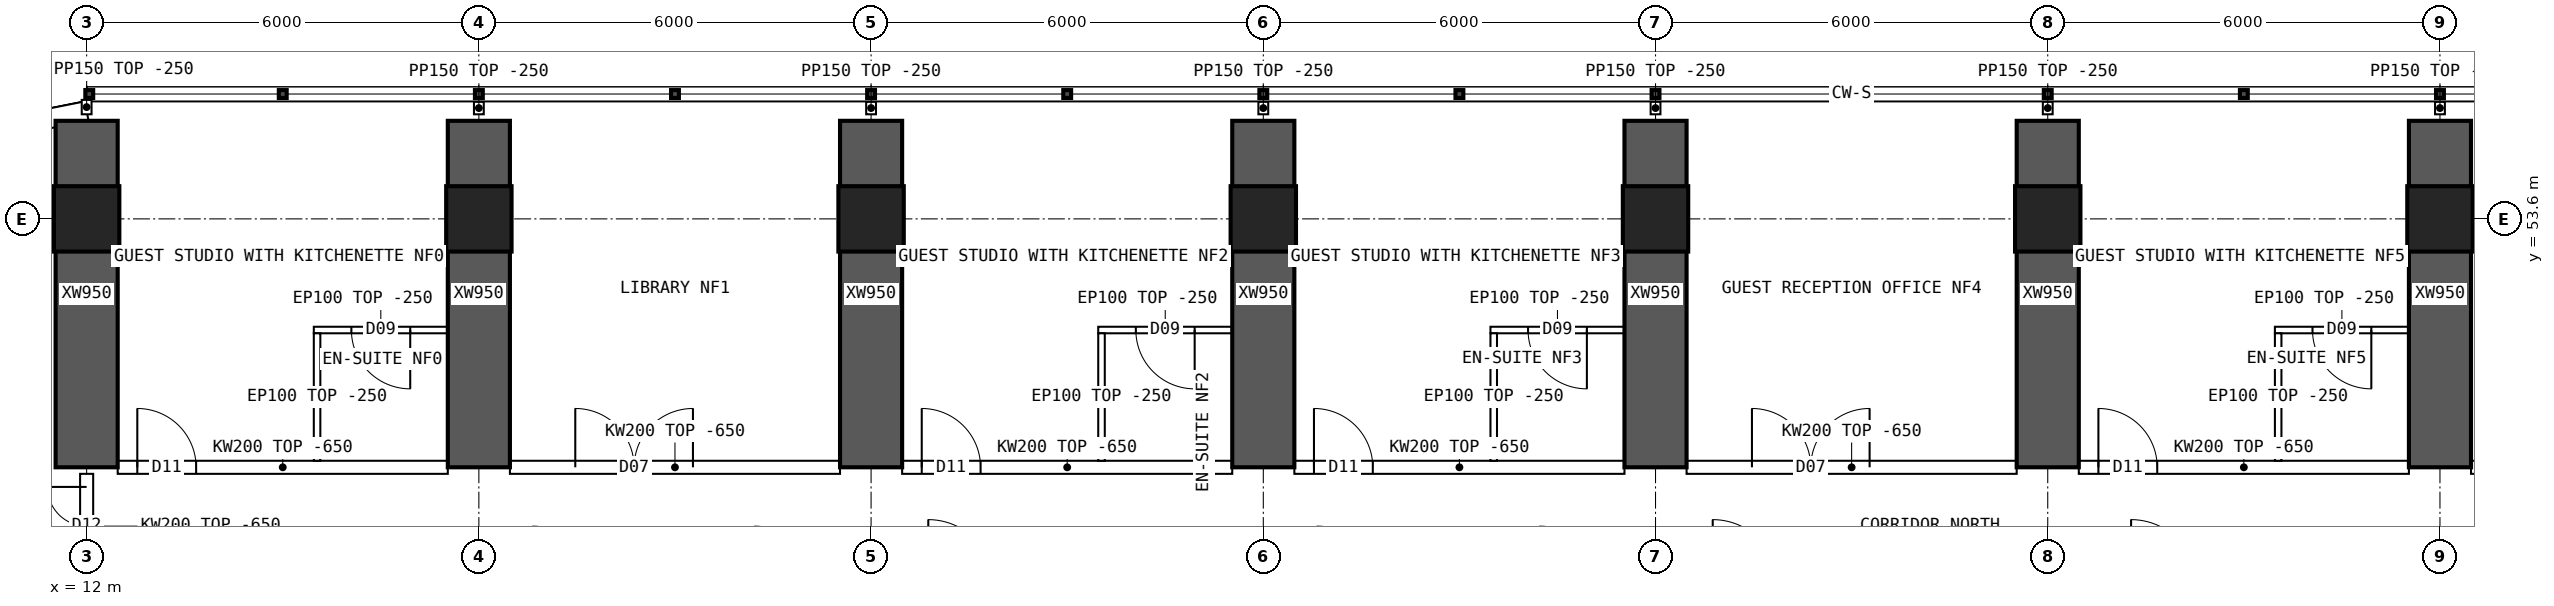
"""IFC4 building model, lengths in metres.
Left out: names, types, materials, properties, quantities, classifications, styles, units other than length and angle.
Written with IfcOpenShell. Run it as: python <this file> out.ifc"""

import sys

from ifc_helpers import new_model, si_unit, direction, frame, frame_2d, origin, origin_2d, place, context, subcontext, project, spatial, polyline, rectangle, hollow_rectangle, outline, extrude, element, fill, save


model = new_model("IFC4")
c1 = context("Model", 3, precision=1e-05, world=origin(), true_north=direction((0.0, 1.0)))
c2 = subcontext(c1, "Body", "Model", "MODEL_VIEW")
j1 = project(units=[si_unit("LENGTHUNIT", "METRE"), si_unit("PLANEANGLEUNIT", "RADIAN")], contexts=[c1])
p1 = place(None, origin())
s1 = spatial("IfcSite", under=j1, at=p1, CompositionType="ELEMENT")
p2 = place(p1, origin())
s2 = spatial("IfcBuilding", under=s1, at=p2, CompositionType="ELEMENT")
p3 = place(p2, frame((0.0, 0.0, 76.15)))
s3 = spatial("IfcBuildingStorey", under=s2, at=p3, CompositionType="ELEMENT", Elevation=76.15)
for number, where, z_axis, x_axis in (
    (1, (12.0, 53.6, 0.0), (0.0, 0.0, 1.0), (1.0, 0.0, 0.0)),
    (2, (18.0, 53.6, 0.0), (0.0, 0.0, 1.0), (1.0, 0.0, 0.0)),
    (3, (24.0, 53.6, 0.0), (0.0, 0.0, 1.0), (1.0, 0.0, 0.0)),
    (4, (30.0, 53.6, 0.0), (0.0, 0.0, 1.0), (1.0, 0.0, 0.0)),
    (5, (36.0, 53.6, 0.0), (0.0, 0.0, 1.0), (1.0, 0.0, 0.0)),
    (6, (42.0, 53.6, 0.0), (0.0, 0.0, 1.0), (1.0, 0.0, 0.0)),
    (7, (48.0, 53.6, 0.0), (0.0, 0.0, 1.0), (1.0, 0.0, 0.0)),
):
    element("IfcColumn", number, at=place(p3, frame(where, z_axis=z_axis, x_axis=x_axis)), inside=s3, PredefinedType="COLUMN", context=c2, shape_type="SweptSolid", body=[
        extrude(hollow_rectangle(XDim=1.0, YDim=1.0, WallThickness=0.1, at=origin_2d()), origin(), (0.0, 0.0, 1.0), 4.5),
    ])
for number, where, z_axis, x_axis in (
    (8, (12.0, 49.8, 0.0), (0.0, 0.0, 1.0), (0.0, 1.0, 0.0)),
    (9, (18.0, 49.8, 0.0), (0.0, 0.0, 1.0), (0.0, 1.0, 0.0)),
    (10, (24.0, 49.8, 0.0), (0.0, 0.0, 1.0), (0.0, 1.0, 0.0)),
    (11, (30.0, 49.8, 0.0), (0.0, 0.0, 1.0), (0.0, 1.0, 0.0)),
    (12, (36.0, 49.8, 0.0), (0.0, 0.0, 1.0), (0.0, 1.0, 0.0)),
    (13, (42.0, 49.8, 0.0), (0.0, 0.0, 1.0), (0.0, 1.0, 0.0)),
    (14, (48.0, 49.8, 0.0), (0.0, 0.0, 1.0), (0.0, 1.0, 0.0)),
):
    element("IfcWall", number, at=place(p3, frame(where, z_axis=z_axis, x_axis=x_axis)), inside=s3, PredefinedType="SHEAR", context=c2, shape_type="SweptSolid", body=[
        extrude(rectangle(XDim=5.3, YDim=0.95, at=frame_2d((2.65, 0.0))), origin(), (0.0, 0.0, 1.0), 4.5),
    ])
p4 = place(p3, frame((12.0, 55.25, 0.0), z_axis=(0.0, 0.0, 1.0), x_axis=(-0.980787251524, -0.195080412259, 0.0)))
e15 = element("IfcWall", 15, at=p4, inside=s3, PredefinedType="SOLIDWALL", context=c2, shape_type="SweptSolid", body=[
    extrude(outline(polyline([(-0.03, -0.15), (3.249, -0.15), (3.189, 0.15), (0.03, 0.15), (-0.03, -0.15)])), origin(), (0.0, 0.0, 1.0), 4.25),
])
p5 = place(p4, frame((0.909, 0.0, 0.9)))
e16 = element("IfcOpeningElement", 16, at=p5, cuts=e15, PredefinedType="OPENING", context=c2, shape_type="SweptSolid", body=[
    extrude(rectangle(XDim=1.4, YDim=1.8, at=frame_2d((0.7, 0.9))), frame((0.0, 0.16, 0.0), z_axis=(0.0, -1.0, 0.0), x_axis=(1.0, 0.0, 0.0)), (0.0, 0.0, 1.0), 0.32),
])
p6 = place(p3, frame((8.844, 55.819, 0.0), z_axis=(0.0, 0.0, 1.0), x_axis=(0.980792126237, 0.195055902531, 0.0)))
e17 = element("IfcWall", 17, at=p6, inside=s3, PredefinedType="PARAPET", context=c2, shape_type="SweptSolid", body=[
    extrude(rectangle(XDim=3.233, YDim=0.2, at=frame_2d((1.616, 0.0))), origin(), (0.0, 0.0, 1.0), 1.1),
])
p7 = place(p3, frame((12.475, 49.8, 0.0), z_axis=(0.0, 0.0, 1.0), x_axis=(1.0, 0.0, 0.0)))
e18 = element("IfcWall", 18, at=p7, inside=s3, PredefinedType="SOLIDWALL", context=c2, shape_type="SweptSolid", body=[
    extrude(outline(polyline([(0.0, 0.0), (5.05, 0.0), (5.05, 3.85), (0.0, 3.85), (0.0, 0.0)])), frame((0.0, 0.1, 0.0), z_axis=(0.0, -1.0, 0.0), x_axis=(1.0, 0.0, 0.0)), (0.0, 0.0, 1.0), 0.2),
])
p8 = place(p7, frame((0.3, 0.0, 0.0)))
e19 = element("IfcOpeningElement", 19, at=p8, cuts=e18, PredefinedType="OPENING", context=c2, shape_type="SweptSolid", body=[
    extrude(rectangle(XDim=0.9, YDim=2.1, at=frame_2d((0.45, 1.05))), frame((0.0, 0.11, 0.0), z_axis=(0.0, -1.0, 0.0), x_axis=(1.0, 0.0, 0.0)), (0.0, 0.0, 1.0), 0.22),
])
p9 = place(p3, frame((18.475, 49.8, 0.0), z_axis=(0.0, 0.0, 1.0), x_axis=(1.0, 0.0, 0.0)))
e20 = element("IfcWall", 20, at=p9, inside=s3, PredefinedType="SOLIDWALL", context=c2, shape_type="SweptSolid", body=[
    extrude(outline(polyline([(0.0, 0.0), (5.05, 0.0), (5.05, 3.85), (0.0, 3.85), (0.0, 0.0)])), frame((0.0, 0.1, 0.0), z_axis=(0.0, -1.0, 0.0), x_axis=(1.0, 0.0, 0.0)), (0.0, 0.0, 1.0), 0.2),
])
p10 = place(p9, frame((1.0, 0.0, 0.0)))
e21 = element("IfcOpeningElement", 21, at=p10, cuts=e20, PredefinedType="OPENING", context=c2, shape_type="SweptSolid", body=[
    extrude(rectangle(XDim=1.8, YDim=2.1, at=frame_2d((0.9, 1.05))), frame((0.0, 0.11, 0.0), z_axis=(0.0, -1.0, 0.0), x_axis=(1.0, 0.0, 0.0)), (0.0, 0.0, 1.0), 0.22),
])
p11 = place(p3, frame((24.475, 49.8, 0.0), z_axis=(0.0, 0.0, 1.0), x_axis=(1.0, 0.0, 0.0)))
e22 = element("IfcWall", 22, at=p11, inside=s3, PredefinedType="SOLIDWALL", context=c2, shape_type="SweptSolid", body=[
    extrude(outline(polyline([(0.0, 0.0), (5.05, 0.0), (5.05, 3.85), (0.0, 3.85), (0.0, 0.0)])), frame((0.0, 0.1, 0.0), z_axis=(0.0, -1.0, 0.0), x_axis=(1.0, 0.0, 0.0)), (0.0, 0.0, 1.0), 0.2),
])
p12 = place(p11, frame((0.3, 0.0, 0.0)))
e23 = element("IfcOpeningElement", 23, at=p12, cuts=e22, PredefinedType="OPENING", context=c2, shape_type="SweptSolid", body=[
    extrude(rectangle(XDim=0.9, YDim=2.1, at=frame_2d((0.45, 1.05))), frame((0.0, 0.11, 0.0), z_axis=(0.0, -1.0, 0.0), x_axis=(1.0, 0.0, 0.0)), (0.0, 0.0, 1.0), 0.22),
])
p13 = place(p3, frame((30.475, 49.8, 0.0), z_axis=(0.0, 0.0, 1.0), x_axis=(1.0, 0.0, 0.0)))
e24 = element("IfcWall", 24, at=p13, inside=s3, PredefinedType="SOLIDWALL", context=c2, shape_type="SweptSolid", body=[
    extrude(outline(polyline([(0.0, 0.0), (5.05, 0.0), (5.05, 3.85), (0.0, 3.85), (0.0, 0.0)])), frame((0.0, 0.1, 0.0), z_axis=(0.0, -1.0, 0.0), x_axis=(1.0, 0.0, 0.0)), (0.0, 0.0, 1.0), 0.2),
])
p14 = place(p13, frame((0.3, 0.0, 0.0)))
e25 = element("IfcOpeningElement", 25, at=p14, cuts=e24, PredefinedType="OPENING", context=c2, shape_type="SweptSolid", body=[
    extrude(rectangle(XDim=0.9, YDim=2.1, at=frame_2d((0.45, 1.05))), frame((0.0, 0.11, 0.0), z_axis=(0.0, -1.0, 0.0), x_axis=(1.0, 0.0, 0.0)), (0.0, 0.0, 1.0), 0.22),
])
p15 = place(p3, frame((36.475, 49.8, 0.0), z_axis=(0.0, 0.0, 1.0), x_axis=(1.0, 0.0, 0.0)))
e26 = element("IfcWall", 26, at=p15, inside=s3, PredefinedType="SOLIDWALL", context=c2, shape_type="SweptSolid", body=[
    extrude(outline(polyline([(0.0, 0.0), (5.05, 0.0), (5.05, 3.85), (0.0, 3.85), (0.0, 0.0)])), frame((0.0, 0.1, 0.0), z_axis=(0.0, -1.0, 0.0), x_axis=(1.0, 0.0, 0.0)), (0.0, 0.0, 1.0), 0.2),
])
p16 = place(p15, frame((1.0, 0.0, 0.0)))
e27 = element("IfcOpeningElement", 27, at=p16, cuts=e26, PredefinedType="OPENING", context=c2, shape_type="SweptSolid", body=[
    extrude(rectangle(XDim=1.8, YDim=2.1, at=frame_2d((0.9, 1.05))), frame((0.0, 0.11, 0.0), z_axis=(0.0, -1.0, 0.0), x_axis=(1.0, 0.0, 0.0)), (0.0, 0.0, 1.0), 0.22),
])
p17 = place(p3, frame((42.475, 49.8, 0.0), z_axis=(0.0, 0.0, 1.0), x_axis=(1.0, 0.0, 0.0)))
e28 = element("IfcWall", 28, at=p17, inside=s3, PredefinedType="SOLIDWALL", context=c2, shape_type="SweptSolid", body=[
    extrude(outline(polyline([(0.0, 0.0), (5.05, 0.0), (5.05, 3.85), (0.0, 3.85), (0.0, 0.0)])), frame((0.0, 0.1, 0.0), z_axis=(0.0, -1.0, 0.0), x_axis=(1.0, 0.0, 0.0)), (0.0, 0.0, 1.0), 0.2),
])
p18 = place(p17, frame((0.3, 0.0, 0.0)))
e29 = element("IfcOpeningElement", 29, at=p18, cuts=e28, PredefinedType="OPENING", context=c2, shape_type="SweptSolid", body=[
    extrude(rectangle(XDim=0.9, YDim=2.1, at=frame_2d((0.45, 1.05))), frame((0.0, 0.11, 0.0), z_axis=(0.0, -1.0, 0.0), x_axis=(1.0, 0.0, 0.0)), (0.0, 0.0, 1.0), 0.22),
])
p19 = place(p3, frame((48.475, 49.8, 0.0), z_axis=(0.0, 0.0, 1.0), x_axis=(1.0, 0.0, 0.0)))
e30 = element("IfcWall", 30, at=p19, inside=s3, PredefinedType="SOLIDWALL", context=c2, shape_type="SweptSolid", body=[
    extrude(outline(polyline([(0.0, 0.0), (5.05, 0.0), (5.05, 3.85), (0.0, 3.85), (0.0, 0.0)])), frame((0.0, 0.1, 0.0), z_axis=(0.0, -1.0, 0.0), x_axis=(1.0, 0.0, 0.0)), (0.0, 0.0, 1.0), 0.2),
])
p20 = place(p19, frame((0.3, 0.0, 0.0)))
e31 = element("IfcOpeningElement", 31, at=p20, cuts=e30, PredefinedType="OPENING", context=c2, shape_type="SweptSolid", body=[
    extrude(rectangle(XDim=0.9, YDim=2.1, at=frame_2d((0.45, 1.05))), frame((0.0, 0.11, 0.0), z_axis=(0.0, -1.0, 0.0), x_axis=(1.0, 0.0, 0.0)), (0.0, 0.0, 1.0), 0.22),
])
p21 = place(p3, frame((15.475, 51.9, 0.0), z_axis=(0.0, 0.0, 1.0), x_axis=(1.0, 0.0, 0.0)))
e32 = element("IfcWall", 32, at=p21, inside=s3, PredefinedType="PARTITIONING", context=c2, shape_type="SweptSolid", body=[
    extrude(rectangle(XDim=2.05, YDim=0.1, at=frame_2d((1.025, 0.0))), origin(), (0.0, 0.0, 1.0), 4.25),
])
p22 = place(p21, frame((0.575, 0.0, 0.0)))
e33 = element("IfcOpeningElement", 33, at=p22, cuts=e32, PredefinedType="OPENING", context=c2, shape_type="SweptSolid", body=[
    extrude(rectangle(XDim=0.9, YDim=2.1, at=frame_2d((0.45, 1.05))), frame((0.0, 0.06, 0.0), z_axis=(0.0, -1.0, 0.0), x_axis=(1.0, 0.0, 0.0)), (0.0, 0.0, 1.0), 0.12),
])
p23 = place(p3, frame((15.525, 51.85, 0.0), z_axis=(0.0, 0.0, 1.0), x_axis=(0.0, -1.0, 0.0)))
e34 = element("IfcWall", 34, at=p23, inside=s3, PredefinedType="PARTITIONING", context=c2, shape_type="SweptSolid", body=[
    extrude(outline(polyline([(0.0, 0.0), (1.95, 0.0), (1.95, 3.85), (1.902, 3.85), (1.9, 4.25), (0.0, 4.25), (0.0, 0.0)])), frame((0.0, 0.05, 0.0), z_axis=(0.0, -1.0, 0.0), x_axis=(1.0, 0.0, 0.0)), (0.0, 0.0, 1.0), 0.1),
])
p24 = place(p3, frame((27.475, 51.9, 0.0), z_axis=(0.0, 0.0, 1.0), x_axis=(1.0, 0.0, 0.0)))
e35 = element("IfcWall", 35, at=p24, inside=s3, PredefinedType="PARTITIONING", context=c2, shape_type="SweptSolid", body=[
    extrude(rectangle(XDim=2.05, YDim=0.1, at=frame_2d((1.025, 0.0))), origin(), (0.0, 0.0, 1.0), 4.25),
])
p25 = place(p24, frame((0.575, 0.0, 0.0)))
e36 = element("IfcOpeningElement", 36, at=p25, cuts=e35, PredefinedType="OPENING", context=c2, shape_type="SweptSolid", body=[
    extrude(rectangle(XDim=0.9, YDim=2.1, at=frame_2d((0.45, 1.05))), frame((0.0, 0.06, 0.0), z_axis=(0.0, -1.0, 0.0), x_axis=(1.0, 0.0, 0.0)), (0.0, 0.0, 1.0), 0.12),
])
p26 = place(p3, frame((27.525, 51.85, 0.0), z_axis=(0.0, 0.0, 1.0), x_axis=(0.0, -1.0, 0.0)))
e37 = element("IfcWall", 37, at=p26, inside=s3, PredefinedType="PARTITIONING", context=c2, shape_type="SweptSolid", body=[
    extrude(outline(polyline([(0.0, 0.0), (1.95, 0.0), (1.95, 3.85), (1.902, 3.85), (1.9, 4.25), (0.0, 4.25), (0.0, 0.0)])), frame((0.0, 0.05, 0.0), z_axis=(0.0, -1.0, 0.0), x_axis=(1.0, 0.0, 0.0)), (0.0, 0.0, 1.0), 0.1),
])
p27 = place(p3, frame((33.475, 51.9, 0.0), z_axis=(0.0, 0.0, 1.0), x_axis=(1.0, 0.0, 0.0)))
e38 = element("IfcWall", 38, at=p27, inside=s3, PredefinedType="PARTITIONING", context=c2, shape_type="SweptSolid", body=[
    extrude(rectangle(XDim=2.05, YDim=0.1, at=frame_2d((1.025, 0.0))), origin(), (0.0, 0.0, 1.0), 4.25),
])
p28 = place(p27, frame((0.575, 0.0, 0.0)))
e39 = element("IfcOpeningElement", 39, at=p28, cuts=e38, PredefinedType="OPENING", context=c2, shape_type="SweptSolid", body=[
    extrude(rectangle(XDim=0.9, YDim=2.1, at=frame_2d((0.45, 1.05))), frame((0.0, 0.06, 0.0), z_axis=(0.0, -1.0, 0.0), x_axis=(1.0, 0.0, 0.0)), (0.0, 0.0, 1.0), 0.12),
])
p29 = place(p3, frame((33.525, 51.85, 0.0), z_axis=(0.0, 0.0, 1.0), x_axis=(0.0, -1.0, 0.0)))
e40 = element("IfcWall", 40, at=p29, inside=s3, PredefinedType="PARTITIONING", context=c2, shape_type="SweptSolid", body=[
    extrude(outline(polyline([(0.0, 0.0), (1.95, 0.0), (1.95, 3.85), (1.902, 3.85), (1.9, 4.25), (0.0, 4.25), (0.0, 0.0)])), frame((0.0, 0.05, 0.0), z_axis=(0.0, -1.0, 0.0), x_axis=(1.0, 0.0, 0.0)), (0.0, 0.0, 1.0), 0.1),
])
p30 = place(p3, frame((45.475, 51.9, 0.0), z_axis=(0.0, 0.0, 1.0), x_axis=(1.0, 0.0, 0.0)))
e41 = element("IfcWall", 41, at=p30, inside=s3, PredefinedType="PARTITIONING", context=c2, shape_type="SweptSolid", body=[
    extrude(rectangle(XDim=2.05, YDim=0.1, at=frame_2d((1.025, 0.0))), origin(), (0.0, 0.0, 1.0), 4.25),
])
p31 = place(p30, frame((0.575, 0.0, 0.0)))
e42 = element("IfcOpeningElement", 42, at=p31, cuts=e41, PredefinedType="OPENING", context=c2, shape_type="SweptSolid", body=[
    extrude(rectangle(XDim=0.9, YDim=2.1, at=frame_2d((0.45, 1.05))), frame((0.0, 0.06, 0.0), z_axis=(0.0, -1.0, 0.0), x_axis=(1.0, 0.0, 0.0)), (0.0, 0.0, 1.0), 0.12),
])
p32 = place(p3, frame((45.525, 51.85, 0.0), z_axis=(0.0, 0.0, 1.0), x_axis=(0.0, -1.0, 0.0)))
e43 = element("IfcWall", 43, at=p32, inside=s3, PredefinedType="PARTITIONING", context=c2, shape_type="SweptSolid", body=[
    extrude(outline(polyline([(0.0, 0.0), (1.95, 0.0), (1.95, 3.85), (1.902, 3.85), (1.9, 4.25), (0.0, 4.25), (0.0, 0.0)])), frame((0.0, 0.05, 0.0), z_axis=(0.0, -1.0, 0.0), x_axis=(1.0, 0.0, 0.0)), (0.0, 0.0, 1.0), 0.1),
])
p33 = place(p3, frame((12.0, 48.1, 0.0), z_axis=(0.0, 0.0, 1.0), x_axis=(0.0, 1.0, 0.0)))
e44 = element("IfcWall", 44, at=p33, inside=s3, PredefinedType="SOLIDWALL", context=c2, shape_type="SweptSolid", body=[
    extrude(outline(polyline([(0.0, 0.0), (1.6, 0.0), (1.6, 3.85), (0.0, 3.85), (0.0, 0.0)])), frame((0.0, 0.1, 0.0), z_axis=(0.0, -1.0, 0.0), x_axis=(1.0, 0.0, 0.0)), (0.0, 0.0, 1.0), 0.2),
])
p34 = place(p33, frame((0.2, 0.0, 0.0)))
e45 = element("IfcOpeningElement", 45, at=p34, cuts=e44, PredefinedType="OPENING", context=c2, shape_type="SweptSolid", body=[
    extrude(rectangle(XDim=1.2, YDim=2.1, at=frame_2d((0.6, 1.05))), frame((0.0, 0.11, 0.0), z_axis=(0.0, -1.0, 0.0), x_axis=(1.0, 0.0, 0.0)), (0.0, 0.0, 1.0), 0.22),
])
p35 = place(p3, frame((12.0, 55.2, 0.0), z_axis=(0.0, 0.0, 1.0), x_axis=(0.0, 1.0, 0.0)))
e46 = element("IfcWall", 46, at=p35, inside=s3, PredefinedType="PARTITIONING", context=c2, shape_type="SweptSolid", body=[
    extrude(rectangle(XDim=0.22, YDim=0.15, at=frame_2d((0.11, 0.0))), origin(), (0.0, 0.0, 1.0), 4.25),
])
for number, where, z_axis, x_axis in (
    (47, (18.0, 55.2, 0.0), (0.0, 0.0, 1.0), (0.0, 1.0, 0.0)),
    (48, (24.0, 55.2, 0.0), (0.0, 0.0, 1.0), (0.0, 1.0, 0.0)),
    (49, (30.0, 55.2, 0.0), (0.0, 0.0, 1.0), (0.0, 1.0, 0.0)),
    (50, (36.0, 55.2, 0.0), (0.0, 0.0, 1.0), (0.0, 1.0, 0.0)),
    (51, (42.0, 55.2, 0.0), (0.0, 0.0, 1.0), (0.0, 1.0, 0.0)),
    (52, (48.0, 55.2, 0.0), (0.0, 0.0, 1.0), (0.0, 1.0, 0.0)),
):
    element("IfcWall", number, at=place(p3, frame(where, z_axis=z_axis, x_axis=x_axis)), inside=s3, PredefinedType="PARTITIONING", context=c2, shape_type="SweptSolid", body=[
        extrude(rectangle(XDim=0.19, YDim=0.15, at=frame_2d((0.095, 0.0))), origin(), (0.0, 0.0, 1.0), 4.25),
    ])
p36 = place(p22, origin())
e53 = element("IfcDoor", 53, at=p36, inside=s3, OperationType="SINGLE_SWING_RIGHT", PredefinedType="DOOR", context=c2, shape_type="SweptSolid", body=[
    extrude(rectangle(XDim=0.9, YDim=2.1, at=frame_2d((0.45, 1.05))), frame((0.0, 0.025, 0.0), z_axis=(0.0, -1.0, 0.0), x_axis=(1.0, 0.0, 0.0)), (0.0, 0.0, 1.0), 0.05),
])
fill(e33, e53)
p37 = place(p8, origin())
e54 = element("IfcDoor", 54, at=p37, inside=s3, OperationType="SINGLE_SWING_LEFT", PredefinedType="DOOR", context=c2, shape_type="SweptSolid", body=[
    extrude(rectangle(XDim=0.9, YDim=2.1, at=frame_2d((0.45, 1.05))), frame((0.0, 0.025, 0.0), z_axis=(0.0, -1.0, 0.0), x_axis=(1.0, 0.0, 0.0)), (0.0, 0.0, 1.0), 0.05),
])
fill(e19, e54)
p38 = place(p10, origin())
e55 = element("IfcDoor", 55, at=p38, inside=s3, OperationType="DOUBLE_DOOR_SINGLE_SWING", PredefinedType="DOOR", context=c2, shape_type="SweptSolid", body=[
    extrude(rectangle(XDim=1.8, YDim=2.1, at=frame_2d((0.9, 1.05))), frame((0.0, 0.025, 0.0), z_axis=(0.0, -1.0, 0.0), x_axis=(1.0, 0.0, 0.0)), (0.0, 0.0, 1.0), 0.05),
])
fill(e21, e55)
p39 = place(p25, origin())
e56 = element("IfcDoor", 56, at=p39, inside=s3, OperationType="SINGLE_SWING_RIGHT", PredefinedType="DOOR", context=c2, shape_type="SweptSolid", body=[
    extrude(rectangle(XDim=0.9, YDim=2.1, at=frame_2d((0.45, 1.05))), frame((0.0, 0.025, 0.0), z_axis=(0.0, -1.0, 0.0), x_axis=(1.0, 0.0, 0.0)), (0.0, 0.0, 1.0), 0.05),
])
fill(e36, e56)
p40 = place(p12, origin())
e57 = element("IfcDoor", 57, at=p40, inside=s3, OperationType="SINGLE_SWING_LEFT", PredefinedType="DOOR", context=c2, shape_type="SweptSolid", body=[
    extrude(rectangle(XDim=0.9, YDim=2.1, at=frame_2d((0.45, 1.05))), frame((0.0, 0.025, 0.0), z_axis=(0.0, -1.0, 0.0), x_axis=(1.0, 0.0, 0.0)), (0.0, 0.0, 1.0), 0.05),
])
fill(e23, e57)
p41 = place(p28, origin())
e58 = element("IfcDoor", 58, at=p41, inside=s3, OperationType="SINGLE_SWING_RIGHT", PredefinedType="DOOR", context=c2, shape_type="SweptSolid", body=[
    extrude(rectangle(XDim=0.9, YDim=2.1, at=frame_2d((0.45, 1.05))), frame((0.0, 0.025, 0.0), z_axis=(0.0, -1.0, 0.0), x_axis=(1.0, 0.0, 0.0)), (0.0, 0.0, 1.0), 0.05),
])
fill(e39, e58)
p42 = place(p14, origin())
e59 = element("IfcDoor", 59, at=p42, inside=s3, OperationType="SINGLE_SWING_LEFT", PredefinedType="DOOR", context=c2, shape_type="SweptSolid", body=[
    extrude(rectangle(XDim=0.9, YDim=2.1, at=frame_2d((0.45, 1.05))), frame((0.0, 0.025, 0.0), z_axis=(0.0, -1.0, 0.0), x_axis=(1.0, 0.0, 0.0)), (0.0, 0.0, 1.0), 0.05),
])
fill(e25, e59)
p43 = place(p16, origin())
e60 = element("IfcDoor", 60, at=p43, inside=s3, OperationType="DOUBLE_DOOR_SINGLE_SWING", PredefinedType="DOOR", context=c2, shape_type="SweptSolid", body=[
    extrude(rectangle(XDim=1.8, YDim=2.1, at=frame_2d((0.9, 1.05))), frame((0.0, 0.025, 0.0), z_axis=(0.0, -1.0, 0.0), x_axis=(1.0, 0.0, 0.0)), (0.0, 0.0, 1.0), 0.05),
])
fill(e27, e60)
p44 = place(p31, origin())
e61 = element("IfcDoor", 61, at=p44, inside=s3, OperationType="SINGLE_SWING_RIGHT", PredefinedType="DOOR", context=c2, shape_type="SweptSolid", body=[
    extrude(rectangle(XDim=0.9, YDim=2.1, at=frame_2d((0.45, 1.05))), frame((0.0, 0.025, 0.0), z_axis=(0.0, -1.0, 0.0), x_axis=(1.0, 0.0, 0.0)), (0.0, 0.0, 1.0), 0.05),
])
fill(e42, e61)
p45 = place(p18, origin())
e62 = element("IfcDoor", 62, at=p45, inside=s3, OperationType="SINGLE_SWING_LEFT", PredefinedType="DOOR", context=c2, shape_type="SweptSolid", body=[
    extrude(rectangle(XDim=0.9, YDim=2.1, at=frame_2d((0.45, 1.05))), frame((0.0, 0.025, 0.0), z_axis=(0.0, -1.0, 0.0), x_axis=(1.0, 0.0, 0.0)), (0.0, 0.0, 1.0), 0.05),
])
fill(e29, e62)
p46 = place(p34, origin())
e63 = element("IfcDoor", 63, at=p46, inside=s3, OperationType="DOUBLE_DOOR_SINGLE_SWING", PredefinedType="DOOR", context=c2, shape_type="SweptSolid", body=[
    extrude(rectangle(XDim=1.2, YDim=2.1, at=frame_2d((0.6, 1.05))), frame((0.0, 0.025, 0.0), z_axis=(0.0, -1.0, 0.0), x_axis=(1.0, 0.0, 0.0)), (0.0, 0.0, 1.0), 0.05),
])
fill(e45, e63)
save(model, sys.argv[1])
